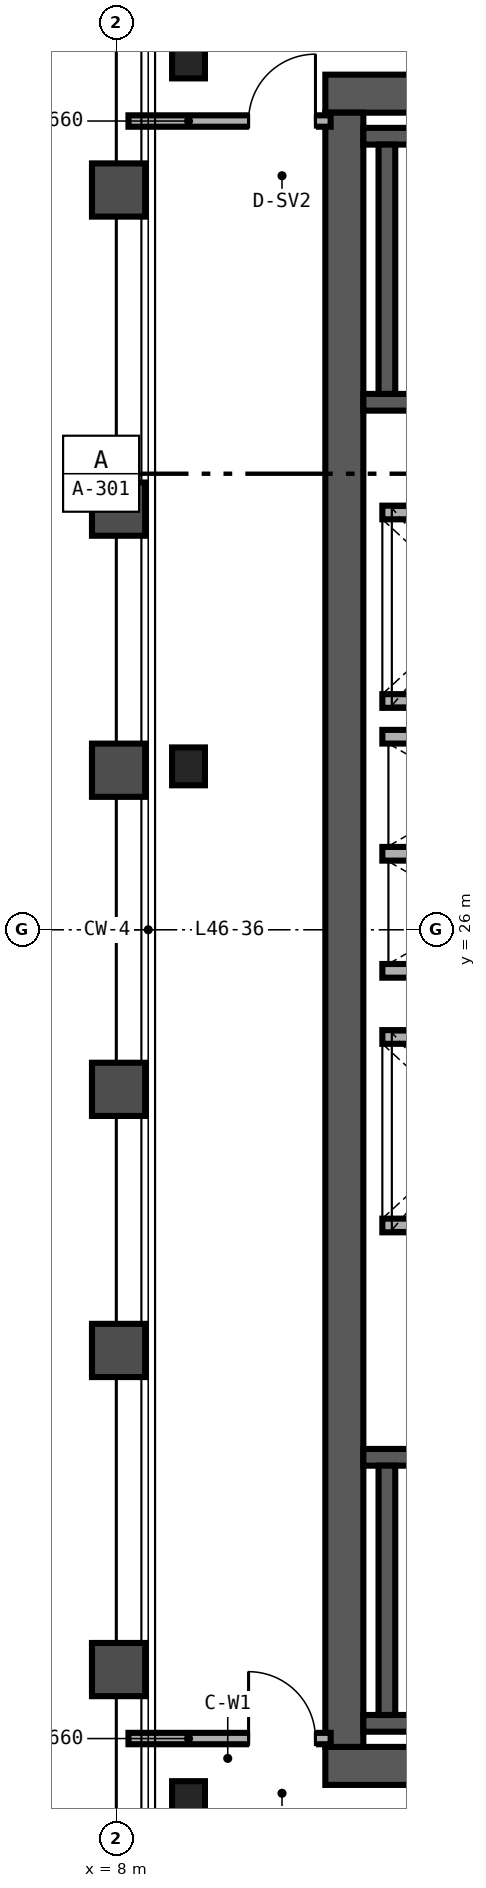
"""IFC4 building model, lengths in metres.
Left out: names, types, materials, properties, quantities, classifications, styles, units other than length and angle.
Written with IfcOpenShell. Run it as: python <this file> out.ifc"""

import sys

from ifc_helpers import new_model, si_unit, direction, frame, frame_2d, origin, origin_2d, place, context, subcontext, project, spatial, rectangle, i_section, extrude, source, transform, mapped, element, fill, save


model = new_model("IFC4")
c1 = context("Model", 3, precision=1e-05, world=origin(), true_north=direction((0.0, 1.0)))
c2 = subcontext(c1, "Body", "Model", "MODEL_VIEW")
j1 = project(units=[si_unit("LENGTHUNIT", "METRE"), si_unit("PLANEANGLEUNIT", "RADIAN")], contexts=[c1])
p1 = place(None, origin())
s1 = spatial("IfcSite", under=j1, at=p1, CompositionType="ELEMENT")
p2 = place(p1, origin())
s2 = spatial("IfcBuilding", under=s1, at=p2, CompositionType="ELEMENT")
p3 = place(p2, frame((0.0, 0.0, 184.8)))
s3 = spatial("IfcBuildingStorey", under=s2, at=p3, CompositionType="ELEMENT", Elevation=184.8)
p4 = place(p3, frame((10.75, 15.0, 0.0), z_axis=(0.0, 0.0, 1.0), x_axis=(1.0, 0.0, 0.0)))
e1 = element("IfcWall", 1, at=p4, inside=s3, PredefinedType="SHEAR", context=c2, shape_type="SweptSolid", body=[
    extrude(rectangle(XDim=12.5, YDim=0.5, at=frame_2d((6.25, 0.0))), origin(), (0.0, 0.0, 1.0), 3.37),
])
p5 = place(p4, frame((10.15, 0.0, 0.0)))
e2 = element("IfcOpeningElement", 2, at=p5, cuts=e1, PredefinedType="OPENING", context=c2, shape_type="SweptSolid", body=[
    extrude(rectangle(XDim=1.0, YDim=2.15, at=frame_2d((0.5, 1.075))), frame((0.0, 0.26, 0.0), z_axis=(0.0, -1.0, 0.0), x_axis=(1.0, 0.0, 0.0)), (0.0, 0.0, 1.0), 0.52),
])
p6 = place(p3, frame((10.75, 37.0, 0.0), z_axis=(0.0, 0.0, 1.0), x_axis=(1.0, 0.0, 0.0)))
e3 = element("IfcWall", 3, at=p6, inside=s3, PredefinedType="SHEAR", context=c2, shape_type="SweptSolid", body=[
    extrude(rectangle(XDim=12.5, YDim=0.5, at=frame_2d((6.25, 0.0))), origin(), (0.0, 0.0, 1.0), 3.37),
])
p7 = place(p6, frame((8.83, 0.0, 0.0)))
e4 = element("IfcOpeningElement", 4, at=p7, cuts=e3, PredefinedType="OPENING", context=c2, shape_type="SweptSolid", body=[
    extrude(rectangle(XDim=1.0, YDim=2.15, at=frame_2d((0.5, 1.075))), frame((0.0, 0.26, 0.0), z_axis=(0.0, -1.0, 0.0), x_axis=(1.0, 0.0, 0.0)), (0.0, 0.0, 1.0), 0.52),
])
p8 = place(p3, frame((11.0, 15.25, 0.0), z_axis=(0.0, 0.0, 1.0), x_axis=(0.0, 1.0, 0.0)))
e5 = element("IfcWall", 5, at=p8, inside=s3, PredefinedType="SHEAR", context=c2, shape_type="SweptSolid", body=[
    extrude(rectangle(XDim=21.5, YDim=0.5, at=frame_2d((10.75, 0.0))), origin(), (0.0, 0.0, 1.0), 3.37),
])
p9 = place(p3, frame((11.25, 15.56, 0.0), z_axis=(0.0, 0.0, 1.0), x_axis=(1.0, 0.0, 0.0)))
e6 = element("IfcWall", 6, at=p9, inside=s3, PredefinedType="SHEAR", context=c2, shape_type="SweptSolid", body=[
    extrude(rectangle(XDim=8.06, YDim=0.22, at=frame_2d((4.03, 0.0))), origin(), (0.0, 0.0, 1.0), 3.4),
])
p10 = place(p3, frame((11.25, 19.06, 0.0), z_axis=(0.0, 0.0, 1.0), x_axis=(1.0, 0.0, 0.0)))
e7 = element("IfcWall", 7, at=p10, inside=s3, PredefinedType="SHEAR", context=c2, shape_type="SweptSolid", body=[
    extrude(rectangle(XDim=8.06, YDim=0.22, at=frame_2d((4.03, 0.0))), origin(), (0.0, 0.0, 1.0), 3.4),
])
p11 = place(p10, frame((0.67, 0.0, 0.0)))
e8 = element("IfcOpeningElement", 8, at=p11, cuts=e7, PredefinedType="OPENING", context=c2, shape_type="SweptSolid", body=[
    extrude(rectangle(XDim=1.05, YDim=2.15, at=frame_2d((0.525, 1.075))), frame((0.0, 0.12, 0.0), z_axis=(0.0, -1.0, 0.0), x_axis=(1.0, 0.0, 0.0)), (0.0, 0.0, 1.0), 0.24),
])
p12 = place(p3, frame((11.56, 15.67, 0.0), z_axis=(0.0, 0.0, 1.0), x_axis=(0.0, 1.0, 0.0)))
e9 = element("IfcWall", 9, at=p12, inside=s3, PredefinedType="SHEAR", context=c2, shape_type="SweptSolid", body=[
    extrude(rectangle(XDim=3.28, YDim=0.22, at=frame_2d((1.64, 0.0))), origin(), (0.0, 0.0, 1.0), 3.4),
])
p13 = place(p3, frame((11.25, 32.94, 0.0), z_axis=(0.0, 0.0, 1.0), x_axis=(1.0, 0.0, 0.0)))
e10 = element("IfcWall", 10, at=p13, inside=s3, PredefinedType="SHEAR", context=c2, shape_type="SweptSolid", body=[
    extrude(rectangle(XDim=8.06, YDim=0.22, at=frame_2d((4.03, 0.0))), origin(), (0.0, 0.0, 1.0), 3.4),
])
p14 = place(p13, frame((0.67, 0.0, 0.0)))
e11 = element("IfcOpeningElement", 11, at=p14, cuts=e10, PredefinedType="OPENING", context=c2, shape_type="SweptSolid", body=[
    extrude(rectangle(XDim=1.05, YDim=2.15, at=frame_2d((0.525, 1.075))), frame((0.0, 0.12, 0.0), z_axis=(0.0, -1.0, 0.0), x_axis=(1.0, 0.0, 0.0)), (0.0, 0.0, 1.0), 0.24),
])
p15 = place(p3, frame((11.25, 36.44, 0.0), z_axis=(0.0, 0.0, 1.0), x_axis=(1.0, 0.0, 0.0)))
e12 = element("IfcWall", 12, at=p15, inside=s3, PredefinedType="SHEAR", context=c2, shape_type="SweptSolid", body=[
    extrude(rectangle(XDim=8.06, YDim=0.22, at=frame_2d((4.03, 0.0))), origin(), (0.0, 0.0, 1.0), 3.4),
])
p16 = place(p3, frame((11.56, 33.05, 0.0), z_axis=(0.0, 0.0, 1.0), x_axis=(0.0, 1.0, 0.0)))
e13 = element("IfcWall", 13, at=p16, inside=s3, PredefinedType="SHEAR", context=c2, shape_type="SweptSolid", body=[
    extrude(rectangle(XDim=3.28, YDim=0.22, at=frame_2d((1.64, 0.0))), origin(), (0.0, 0.0, 1.0), 3.4),
])
m1 = source(origin(), c2, "Body", "SweptSolid", [
    extrude(i_section(OverallWidth=0.432, OverallDepth=0.498, WebThickness=0.056, FlangeThickness=0.089, FilletRadius=0.025, at=origin_2d()), origin(), (0.0, 0.0, 1.0), 3.37),
])
for number, where, z_axis, x_axis in (
    (14, (8.95, 14.55, 0.0), (0.0, 0.0, 1.0), (1.0, 0.0, 0.0)),
    (15, (8.95, 28.15, 0.0), (0.0, 0.0, 1.0), (1.0, 0.0, 0.0)),
    (16, (8.95, 37.45, 0.0), (0.0, 0.0, 1.0), (1.0, 0.0, 0.0)),
):
    element("IfcColumn", number, at=place(p3, frame(where, z_axis=z_axis, x_axis=x_axis)), inside=s3, PredefinedType="COLUMN", context=c2, shape_type="MappedRepresentation", body=[
        mapped(m1, transform((0.0, 0.0, 0.0), scale=1.0)),
    ])
for number, where, z_axis, x_axis in (
    (17, (11.5, 22.11, 0.0), (0.0, 0.0, 1.0), (1.0, 0.0, 0.0)),
    (18, (11.5, 24.59, 0.0), (0.0, 0.0, 1.0), (1.0, 0.0, 0.0)),
    (19, (11.5, 29.01, 0.0), (0.0, 0.0, 1.0), (1.0, 0.0, 0.0)),
    (20, (11.5, 31.49, 0.0), (0.0, 0.0, 1.0), (1.0, 0.0, 0.0)),
):
    element("IfcWall", number, at=place(p3, frame(where, z_axis=z_axis, x_axis=x_axis)), inside=s3, PredefinedType="SOLIDWALL", context=c2, shape_type="SweptSolid", body=[
        extrude(rectangle(XDim=2.5, YDim=0.18, at=frame_2d((1.25, 0.0))), origin(), (0.0, 0.0, 1.0), 3.37),
    ])
for number, where, z_axis, x_axis in (
    (21, (11.5, 25.46, 0.0), (0.0, 0.0, 1.0), (1.0, 0.0, 0.0)),
    (22, (11.5, 27.0, 0.0), (0.0, 0.0, 1.0), (1.0, 0.0, 0.0)),
    (23, (11.5, 28.54, 0.0), (0.0, 0.0, 1.0), (1.0, 0.0, 0.0)),
):
    element("IfcWall", number, at=place(p3, frame(where, z_axis=z_axis, x_axis=x_axis)), inside=s3, PredefinedType="SOLIDWALL", context=c2, shape_type="SweptSolid", body=[
        extrude(rectangle(XDim=2.51, YDim=0.18, at=frame_2d((1.255, 0.0))), origin(), (0.0, 0.0, 1.0), 3.37),
    ])
p17 = place(p3, frame((8.16, 15.36, 0.0), z_axis=(0.0, 0.0, 1.0), x_axis=(1.0, 0.0, 0.0)))
e24 = element("IfcWall", 24, at=p17, inside=s3, PredefinedType="PARTITIONING", context=c2, shape_type="SweptSolid", body=[
    extrude(rectangle(XDim=2.66, YDim=0.15, at=frame_2d((1.33, 0.0))), origin(), (0.0, 0.0, 1.0), 2.591),
])
p18 = place(p17, frame((1.58, 0.0, 0.0)))
e25 = element("IfcOpeningElement", 25, at=p18, cuts=e24, PredefinedType="OPENING", context=c2, shape_type="SweptSolid", body=[
    extrude(rectangle(XDim=0.88, YDim=2.15, at=frame_2d((0.44, 1.075))), frame((0.0, 0.085, 0.0), z_axis=(0.0, -1.0, 0.0), x_axis=(1.0, 0.0, 0.0)), (0.0, 0.0, 1.0), 0.17),
])
p19 = place(p3, frame((8.16, 36.64, 0.0), z_axis=(0.0, 0.0, 1.0), x_axis=(1.0, 0.0, 0.0)))
e26 = element("IfcWall", 26, at=p19, inside=s3, PredefinedType="PARTITIONING", context=c2, shape_type="SweptSolid", body=[
    extrude(rectangle(XDim=2.66, YDim=0.15, at=frame_2d((1.33, 0.0))), origin(), (0.0, 0.0, 1.0), 2.753),
])
p20 = place(p19, frame((1.58, 0.0, 0.0)))
e27 = element("IfcOpeningElement", 27, at=p20, cuts=e26, PredefinedType="OPENING", context=c2, shape_type="SweptSolid", body=[
    extrude(rectangle(XDim=0.88, YDim=2.15, at=frame_2d((0.44, 1.075))), frame((0.0, 0.085, 0.0), z_axis=(0.0, -1.0, 0.0), x_axis=(1.0, 0.0, 0.0)), (0.0, 0.0, 1.0), 0.17),
])
m2 = source(origin(), c2, "Body", "SweptSolid", [
    extrude(rectangle(XDim=0.88, YDim=2.15, at=frame_2d((0.44, 1.075))), frame((0.0, 0.025, 0.0), z_axis=(0.0, -1.0, 0.0), x_axis=(1.0, 0.0, 0.0)), (0.0, 0.0, 1.0), 0.05),
])
p21 = place(p18, origin())
e28 = element("IfcDoor", 28, at=p21, inside=s3, OperationType="SINGLE_SWING_LEFT", PredefinedType="DOOR", context=c2, shape_type="MappedRepresentation", body=[
    mapped(m2, transform((0.0, 0.0, 0.0), scale=1.0)),
])
fill(e25, e28)
p22 = place(p20, origin())
e29 = element("IfcDoor", 29, at=p22, inside=s3, OperationType="SINGLE_SWING_RIGHT", PredefinedType="DOOR", context=c2, shape_type="MappedRepresentation", body=[
    mapped(m2, transform((0.0, 0.0, 0.0), scale=1.0)),
])
fill(e27, e29)
save(model, sys.argv[1])
